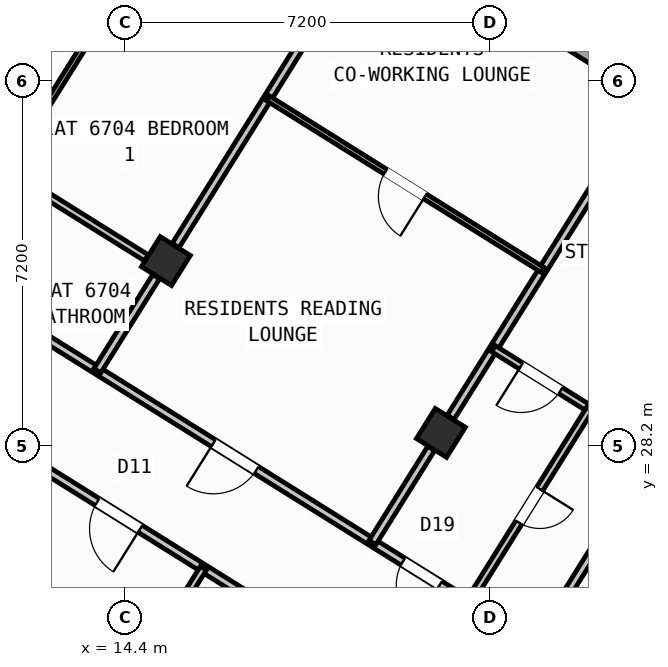
"""IFC4 building model, lengths in metres.
Left out: names, types, materials, properties, quantities, classifications, styles, units other than length and angle.
Written with IfcOpenShell. Run it as: python <this file> out.ifc"""

import sys

from ifc_helpers import new_model, si_unit, direction, frame, frame_2d, origin, origin_2d, place, context, subcontext, project, spatial, rectangle, hollow_rectangle, extrude, source, transform, mapped, element, fill, save


model = new_model("IFC4")
c1 = context("Model", 3, precision=1e-05, world=origin(), true_north=direction((0.0, 1.0)))
c2 = subcontext(c1, "Body", "Model", "MODEL_VIEW")
j1 = project(units=[si_unit("LENGTHUNIT", "METRE"), si_unit("PLANEANGLEUNIT", "RADIAN")], contexts=[c1])
p1 = place(None, origin())
s1 = spatial("IfcSite", under=j1, at=p1, CompositionType="ELEMENT")
p2 = place(p1, origin())
s2 = spatial("IfcBuilding", under=s1, at=p2, CompositionType="ELEMENT")
p3 = place(p2, frame((0.0, 0.0, 266.4)))
s3 = spatial("IfcBuildingStorey", under=s2, at=p3, CompositionType="ELEMENT", Elevation=266.4)
m1 = source(origin(), c2, "Body", "SweptSolid", [
    extrude(hollow_rectangle(XDim=0.7, YDim=0.7, WallThickness=0.028, at=origin_2d()), origin(), (0.0, 0.0, 1.0), 3.6),
])
for number, where, z_axis, x_axis in (
    (1, (20.632, 28.452, 0.0), (0.0, 0.0, 1.0), (-0.848, 0.53, 0.0)),
    (2, (15.205, 31.844, 0.0), (0.0, 0.0, 1.0), (-0.848, 0.53, 0.0)),
):
    element("IfcColumn", number, at=place(p3, frame(where, z_axis=z_axis, x_axis=x_axis)), inside=s3, PredefinedType="COLUMN", context=c2, shape_type="MappedRepresentation", body=[
        mapped(m1, transform((0.0, 0.0, 0.0), scale=1.0)),
    ])
p4 = place(p3, frame((2.415, 23.452, 0.0), z_axis=(0.0, 0.0, 1.0), x_axis=(0.52991049553, 0.848053575387, 0.0)))
e3 = element("IfcWall", 3, at=p4, inside=s3, PredefinedType="STANDARD", context=c2, shape_type="SweptSolid", body=[
    extrude(rectangle(XDim=21.587, YDim=0.32, at=frame_2d((10.794, 0.0))), origin(), (0.0, 0.0, 1.0), 2.875),
])
p5 = place(p4, frame((2.606, 0.0, 0.9)))
e4 = element("IfcOpeningElement", 4, at=p5, cuts=e3, PredefinedType="OPENING", context=c2, shape_type="SweptSolid", body=[
    extrude(rectangle(XDim=1.65, YDim=1.45, at=frame_2d((0.825, 0.725))), frame((0.0, 0.17, 0.0), z_axis=(0.0, -1.0, 0.0), x_axis=(1.0, 0.0, 0.0)), (0.0, 0.0, 1.0), 0.34),
])
p6 = place(p4, frame((7.504, 0.0, 1.0)))
e5 = element("IfcOpeningElement", 5, at=p6, cuts=e3, PredefinedType="OPENING", context=c2, shape_type="SweptSolid", body=[
    extrude(rectangle(XDim=0.9, YDim=1.25, at=frame_2d((0.45, 0.625))), frame((0.0, 0.17, 0.0), z_axis=(0.0, -1.0, 0.0), x_axis=(1.0, 0.0, 0.0)), (0.0, 0.0, 1.0), 0.34),
])
p7 = place(p4, frame((12.084, 0.0, 1.0)))
e6 = element("IfcOpeningElement", 6, at=p7, cuts=e3, PredefinedType="OPENING", context=c2, shape_type="SweptSolid", body=[
    extrude(rectangle(XDim=0.9, YDim=1.25, at=frame_2d((0.45, 0.625))), frame((0.0, 0.17, 0.0), z_axis=(0.0, -1.0, 0.0), x_axis=(1.0, 0.0, 0.0)), (0.0, 0.0, 1.0), 0.34),
])
p8 = place(p4, frame((15.619, 0.0, 1.0)))
e7 = element("IfcOpeningElement", 7, at=p8, cuts=e3, PredefinedType="OPENING", context=c2, shape_type="SweptSolid", body=[
    extrude(rectangle(XDim=0.9, YDim=1.25, at=frame_2d((0.45, 0.625))), frame((0.0, 0.17, 0.0), z_axis=(0.0, -1.0, 0.0), x_axis=(1.0, 0.0, 0.0)), (0.0, 0.0, 1.0), 0.34),
])
p9 = place(p4, frame((18.569, 0.0, 1.0)))
e8 = element("IfcOpeningElement", 8, at=p9, cuts=e3, PredefinedType="OPENING", context=c2, shape_type="SweptSolid", body=[
    extrude(rectangle(XDim=0.9, YDim=1.25, at=frame_2d((0.45, 0.625))), frame((0.0, 0.17, 0.0), z_axis=(0.0, -1.0, 0.0), x_axis=(1.0, 0.0, 0.0)), (0.0, 0.0, 1.0), 0.34),
])
p10 = place(p3, frame((14.138, 41.825, 0.0), z_axis=(0.0, 0.0, 1.0), x_axis=(0.848046498049, -0.529921821731, 0.0)))
e9 = element("IfcWall", 9, at=p10, inside=s3, PredefinedType="STANDARD", context=c2, shape_type="SweptSolid", body=[
    extrude(rectangle(XDim=31.588, YDim=0.32, at=frame_2d((15.794, 0.0))), origin(), (0.0, 0.0, 1.0), 3.35),
])
p11 = place(p10, frame((3.46, 0.0, 0.0)))
e10 = element("IfcOpeningElement", 10, at=p11, cuts=e9, PredefinedType="OPENING", context=c2, shape_type="SweptSolid", body=[
    extrude(rectangle(XDim=1.05, YDim=2.15, at=frame_2d((0.525, 1.075))), frame((0.0, 0.17, 0.0), z_axis=(0.0, -1.0, 0.0), x_axis=(1.0, 0.0, 0.0)), (0.0, 0.0, 1.0), 0.34),
])
p12 = place(p10, frame((0.831, 0.0, 1.0)))
e11 = element("IfcOpeningElement", 11, at=p12, cuts=e9, PredefinedType="OPENING", context=c2, shape_type="SweptSolid", body=[
    extrude(rectangle(XDim=0.9, YDim=1.25, at=frame_2d((0.45, 0.625))), frame((0.0, 0.17, 0.0), z_axis=(0.0, -1.0, 0.0), x_axis=(1.0, 0.0, 0.0)), (0.0, 0.0, 1.0), 0.34),
])
p13 = place(p10, frame((8.719, 0.0, 0.9)))
e12 = element("IfcOpeningElement", 12, at=p13, cuts=e9, PredefinedType="OPENING", context=c2, shape_type="SweptSolid", body=[
    extrude(rectangle(XDim=1.35, YDim=1.45, at=frame_2d((0.675, 0.725))), frame((0.0, 0.17, 0.0), z_axis=(0.0, -1.0, 0.0), x_axis=(1.0, 0.0, 0.0)), (0.0, 0.0, 1.0), 0.34),
])
p14 = place(p10, frame((13.599, 0.0, 0.95)))
e13 = element("IfcOpeningElement", 13, at=p14, cuts=e9, PredefinedType="OPENING", context=c2, shape_type="SweptSolid", body=[
    extrude(rectangle(XDim=1.95, YDim=1.35, at=frame_2d((0.975, 0.675))), frame((0.0, 0.17, 0.0), z_axis=(0.0, -1.0, 0.0), x_axis=(1.0, 0.0, 0.0)), (0.0, 0.0, 1.0), 0.34),
])
p15 = place(p10, frame((17.154, 0.0, 1.0)))
e14 = element("IfcOpeningElement", 14, at=p15, cuts=e9, PredefinedType="OPENING", context=c2, shape_type="SweptSolid", body=[
    extrude(rectangle(XDim=0.9, YDim=1.25, at=frame_2d((0.45, 0.625))), frame((0.0, 0.17, 0.0), z_axis=(0.0, -1.0, 0.0), x_axis=(1.0, 0.0, 0.0)), (0.0, 0.0, 1.0), 0.34),
])
p16 = place(p10, frame((21.719, 0.0, 0.9)))
e15 = element("IfcOpeningElement", 15, at=p16, cuts=e9, PredefinedType="OPENING", context=c2, shape_type="SweptSolid", body=[
    extrude(rectangle(XDim=1.65, YDim=1.45, at=frame_2d((0.825, 0.725))), frame((0.0, 0.17, 0.0), z_axis=(0.0, -1.0, 0.0), x_axis=(1.0, 0.0, 0.0)), (0.0, 0.0, 1.0), 0.34),
])
p17 = place(p10, frame((27.419, 0.0, 0.9)))
e16 = element("IfcOpeningElement", 16, at=p17, cuts=e9, PredefinedType="OPENING", context=c2, shape_type="SweptSolid", body=[
    extrude(rectangle(XDim=1.65, YDim=1.45, at=frame_2d((0.825, 0.725))), frame((0.0, 0.17, 0.0), z_axis=(0.0, -1.0, 0.0), x_axis=(1.0, 0.0, 0.0)), (0.0, 0.0, 1.0), 0.34),
])
p18 = place(p3, frame((27.953, 33.016, 0.0), z_axis=(0.0, 0.0, 1.0), x_axis=(-0.529909450694, -0.848054228257, 0.0)))
e17 = element("IfcWall", 17, at=p18, inside=s3, PredefinedType="PARTITIONING", context=c2, shape_type="SweptSolid", body=[
    extrude(rectangle(XDim=10.3, YDim=0.16, at=frame_2d((5.15, 0.0))), origin(), (0.0, 0.0, 1.0), 3.34),
])
p19 = place(p3, frame((22.495, 24.281, 0.0), z_axis=(0.0, 0.0, 1.0), x_axis=(-0.848052408131, 0.529912363569, 0.0)))
e18 = element("IfcWall", 18, at=p19, inside=s3, PredefinedType="PARTITIONING", context=c2, shape_type="SweptSolid", body=[
    extrude(rectangle(XDim=16.73, YDim=0.16, at=frame_2d((8.365, 0.0))), origin(), (0.0, 0.0, 1.0), 3.34),
])
p20 = place(p19, frame((2.22, 0.0, 0.0)))
e19 = element("IfcOpeningElement", 19, at=p20, cuts=e18, PredefinedType="OPENING", context=c2, shape_type="SweptSolid", body=[
    extrude(rectangle(XDim=0.86, YDim=2.05, at=frame_2d((0.43, 1.025))), frame((0.0, 0.09, 0.0), z_axis=(0.0, -1.0, 0.0), x_axis=(1.0, 0.0, 0.0)), (0.0, 0.0, 1.0), 0.18),
])
p21 = place(p19, frame((6.49, 0.0, 0.0)))
e20 = element("IfcOpeningElement", 20, at=p21, cuts=e18, PredefinedType="OPENING", context=c2, shape_type="SweptSolid", body=[
    extrude(rectangle(XDim=1.0, YDim=2.1, at=frame_2d((0.5, 1.05))), frame((0.0, 0.09, 0.0), z_axis=(0.0, -1.0, 0.0), x_axis=(1.0, 0.0, 0.0)), (0.0, 0.0, 1.0), 0.18),
])
p22 = place(p19, frame((14.76, 0.0, 0.0)))
e21 = element("IfcOpeningElement", 21, at=p22, cuts=e18, PredefinedType="OPENING", context=c2, shape_type="SweptSolid", body=[
    extrude(rectangle(XDim=1.0, YDim=2.1, at=frame_2d((0.5, 1.05))), frame((0.0, 0.09, 0.0), z_axis=(0.0, -1.0, 0.0), x_axis=(1.0, 0.0, 0.0)), (0.0, 0.0, 1.0), 0.18),
])
p23 = place(p3, frame((21.329, 22.416, 0.0), z_axis=(0.0, 0.0, 1.0), x_axis=(-0.848052408131, 0.529912363569, 0.0)))
e22 = element("IfcWall", 22, at=p23, inside=s3, PredefinedType="PARTITIONING", context=c2, shape_type="SweptSolid", body=[
    extrude(rectangle(XDim=16.73, YDim=0.16, at=frame_2d((8.365, 0.0))), origin(), (0.0, 0.0, 1.0), 3.34),
])
p24 = place(p23, frame((1.395, 0.0, 0.0)))
e23 = element("IfcOpeningElement", 23, at=p24, cuts=e22, PredefinedType="OPENING", context=c2, shape_type="SweptSolid", body=[
    extrude(rectangle(XDim=1.0, YDim=2.1, at=frame_2d((0.5, 1.05))), frame((0.0, 0.09, 0.0), z_axis=(0.0, -1.0, 0.0), x_axis=(1.0, 0.0, 0.0)), (0.0, 0.0, 1.0), 0.18),
])
p25 = place(p23, frame((7.82, 0.0, 0.0)))
e24 = element("IfcOpeningElement", 24, at=p25, cuts=e22, PredefinedType="OPENING", context=c2, shape_type="SweptSolid", body=[
    extrude(rectangle(XDim=1.0, YDim=2.1, at=frame_2d((0.5, 1.05))), frame((0.0, 0.09, 0.0), z_axis=(0.0, -1.0, 0.0), x_axis=(1.0, 0.0, 0.0)), (0.0, 0.0, 1.0), 0.18),
])
p26 = place(p23, frame((11.14, 0.0, 0.0)))
e25 = element("IfcOpeningElement", 25, at=p26, cuts=e22, PredefinedType="OPENING", context=c2, shape_type="SweptSolid", body=[
    extrude(rectangle(XDim=1.0, YDim=2.1, at=frame_2d((0.5, 1.05))), frame((0.0, 0.09, 0.0), z_axis=(0.0, -1.0, 0.0), x_axis=(1.0, 0.0, 0.0)), (0.0, 0.0, 1.0), 0.18),
])
p27 = place(p3, frame((15.944, 25.781, 0.0), z_axis=(0.0, 0.0, 1.0), x_axis=(-0.529917480809, -0.848049210561, 0.0)))
e26 = element("IfcWall", 26, at=p27, inside=s3, PredefinedType="PLUMBINGWALL", context=c2, shape_type="SweptSolid", body=[
    extrude(rectangle(XDim=4.58, YDim=0.14, at=frame_2d((2.29, 0.0))), origin(), (0.0, 0.0, 1.0), 3.34),
])
p28 = place(p27, frame((1.9, 0.0, 0.0)))
e27 = element("IfcOpeningElement", 27, at=p28, cuts=e26, PredefinedType="OPENING", context=c2, shape_type="SweptSolid", body=[
    extrude(rectangle(XDim=0.78, YDim=2.05, at=frame_2d((0.39, 1.025))), frame((0.0, 0.08, 0.0), z_axis=(0.0, -1.0, 0.0), x_axis=(1.0, 0.0, 0.0)), (0.0, 0.0, 1.0), 0.16),
])
p29 = place(p3, frame((24.309, 34.336, 0.0), z_axis=(0.0, 0.0, 1.0), x_axis=(-0.529895484599, -0.848062954858, 0.0)))
e28 = element("IfcWall", 28, at=p29, inside=s3, PredefinedType="PARTITIONING", context=c2, shape_type="SweptSolid", body=[
    extrude(rectangle(XDim=6.576, YDim=0.16, at=frame_2d((3.288, 0.0))), origin(), (0.0, 0.0, 1.0), 2.875),
])
p30 = place(p3, frame((20.44, 28.145, 0.0), z_axis=(0.0, 0.0, 1.0), x_axis=(-0.5299186965, -0.848048450915, 0.0)))
e29 = element("IfcWall", 29, at=p30, inside=s3, PredefinedType="PARTITIONING", context=c2, shape_type="SweptSolid", body=[
    extrude(rectangle(XDim=2.188, YDim=0.16, at=frame_2d((1.094, 0.0))), origin(), (0.0, 0.0, 1.0), 2.875),
])
p31 = place(p3, frame((24.885, 28.106, 0.0), z_axis=(0.0, 0.0, 1.0), x_axis=(-0.848059820872, 0.529900500304, 0.0)))
e30 = element("IfcWall", 30, at=p31, inside=s3, PredefinedType="PLUMBINGWALL", context=c2, shape_type="SweptSolid", body=[
    extrude(rectangle(XDim=3.79, YDim=0.14, at=frame_2d((1.895, 0.0))), origin(), (0.0, 0.0, 1.0), 3.34),
])
p32 = place(p31, frame((2.23, 0.0, 0.0)))
e31 = element("IfcOpeningElement", 31, at=p32, cuts=e30, PredefinedType="OPENING", context=c2, shape_type="SweptSolid", body=[
    extrude(rectangle(XDim=0.92, YDim=2.08, at=frame_2d((0.46, 1.04))), frame((0.0, 0.08, 0.0), z_axis=(0.0, -1.0, 0.0), x_axis=(1.0, 0.0, 0.0)), (0.0, 0.0, 1.0), 0.16),
])
p33 = place(p3, frame((23.57, 28.927, 0.0), z_axis=(0.0, 0.0, 1.0), x_axis=(-0.529911350634, -0.84805304107, 0.0)))
e32 = element("IfcWall", 32, at=p33, inside=s3, PredefinedType="PLUMBINGWALL", context=c2, shape_type="SweptSolid", body=[
    extrude(rectangle(XDim=4.51, YDim=0.14, at=frame_2d((2.255, 0.0))), origin(), (0.0, 0.0, 1.0), 3.025),
])
p34 = place(p33, frame((1.865, 0.0, 0.0)))
e33 = element("IfcOpeningElement", 33, at=p34, cuts=e32, PredefinedType="OPENING", context=c2, shape_type="SweptSolid", body=[
    extrude(rectangle(XDim=0.78, YDim=2.05, at=frame_2d((0.39, 1.025))), frame((0.0, 0.08, 0.0), z_axis=(0.0, -1.0, 0.0), x_axis=(1.0, 0.0, 0.0)), (0.0, 0.0, 1.0), 0.16),
])
p35 = place(p3, frame((18.881, 37.727, 0.0), z_axis=(0.0, 0.0, 1.0), x_axis=(-0.529938869374, -0.84803584519, 0.0)))
e34 = element("IfcWall", 34, at=p35, inside=s3, PredefinedType="PARTITIONING", context=c2, shape_type="SweptSolid", body=[
    extrude(rectangle(XDim=6.576, YDim=0.16, at=frame_2d((3.288, 0.0))), origin(), (0.0, 0.0, 1.0), 2.875),
])
p36 = place(p3, frame((15.013, 31.537, 0.0), z_axis=(0.0, 0.0, 1.0), x_axis=(-0.5299186965, -0.848048450915, 0.0)))
e35 = element("IfcWall", 35, at=p36, inside=s3, PredefinedType="PARTITIONING", context=c2, shape_type="SweptSolid", body=[
    extrude(rectangle(XDim=2.188, YDim=0.16, at=frame_2d((1.094, 0.0))), origin(), (0.0, 0.0, 1.0), 2.875),
])
p37 = place(p3, frame((22.642, 31.668, 0.0), z_axis=(0.0, 0.0, 1.0), x_axis=(-0.84806687439, 0.529889211593, 0.0)))
e36 = element("IfcWall", 36, at=p37, inside=s3, PredefinedType="PARTITIONING", context=c2, shape_type="SweptSolid", body=[
    extrude(rectangle(XDim=6.4, YDim=0.11, at=frame_2d((3.2, 0.0))), origin(), (0.0, 0.0, 1.0), 3.34),
])
p38 = place(p37, frame((2.74, 0.0, 0.0)))
e37 = element("IfcOpeningElement", 37, at=p38, cuts=e36, PredefinedType="OPENING", context=c2, shape_type="SweptSolid", body=[
    extrude(rectangle(XDim=0.92, YDim=2.08, at=frame_2d((0.46, 1.04))), frame((0.0, 0.065, 0.0), z_axis=(0.0, -1.0, 0.0), x_axis=(1.0, 0.0, 0.0)), (0.0, 0.0, 1.0), 0.13),
])
p39 = place(p3, frame((16.385, 40.563, 0.0), z_axis=(0.0, 0.0, 1.0), x_axis=(-0.529924195719, -0.848045014602, 0.0)))
e38 = element("IfcWall", 38, at=p39, inside=s3, PredefinedType="PARTITIONING", context=c2, shape_type="SweptSolid", body=[
    extrude(rectangle(XDim=10.57, YDim=0.11, at=frame_2d((5.285, 0.0))), origin(), (0.0, 0.0, 1.0), 3.34),
])
p40 = place(p39, frame((8.93, 0.0, 0.0)))
e39 = element("IfcOpeningElement", 39, at=p40, cuts=e38, PredefinedType="OPENING", context=c2, shape_type="SweptSolid", body=[
    extrude(rectangle(XDim=0.78, YDim=2.05, at=frame_2d((0.39, 1.025))), frame((0.0, 0.065, 0.0), z_axis=(0.0, -1.0, 0.0), x_axis=(1.0, 0.0, 0.0)), (0.0, 0.0, 1.0), 0.13),
])
p41 = place(p39, frame((3.625, 0.0, 0.0)))
e40 = element("IfcOpeningElement", 40, at=p41, cuts=e38, PredefinedType="OPENING", context=c2, shape_type="SweptSolid", body=[
    extrude(rectangle(XDim=0.92, YDim=2.08, at=frame_2d((0.46, 1.04))), frame((0.0, 0.065, 0.0), z_axis=(0.0, -1.0, 0.0), x_axis=(1.0, 0.0, 0.0)), (0.0, 0.0, 1.0), 0.13),
])
p42 = place(p3, frame((14.818, 31.908, 0.0), z_axis=(0.0, 0.0, 1.0), x_axis=(-0.848036190178, 0.529938317305, 0.0)))
e41 = element("IfcWall", 41, at=p42, inside=s3, PredefinedType="PLUMBINGWALL", context=c2, shape_type="SweptSolid", body=[
    extrude(rectangle(XDim=3.258, YDim=0.14, at=frame_2d((1.629, 0.0))), origin(), (0.0, 0.0, 1.0), 2.875),
])
m2 = source(origin(), c2, "Body", "SweptSolid", [
    extrude(rectangle(XDim=1.0, YDim=2.1, at=frame_2d((0.5, 1.05))), frame((0.0, 0.025, 0.0), z_axis=(0.0, -1.0, 0.0), x_axis=(1.0, 0.0, 0.0)), (0.0, 0.0, 1.0), 0.05),
])
p43 = place(p25, origin())
e42 = element("IfcDoor", 42, at=p43, inside=s3, OperationType="SINGLE_SWING_LEFT", PredefinedType="DOOR", context=c2, shape_type="MappedRepresentation", body=[
    mapped(m2, transform((0.0, 0.0, 0.0), scale=1.0)),
])
fill(e24, e42)
m3 = source(origin(), c2, "Body", "SweptSolid", [
    extrude(rectangle(XDim=0.86, YDim=2.05, at=frame_2d((0.43, 1.025))), frame((0.0, 0.025, 0.0), z_axis=(0.0, -1.0, 0.0), x_axis=(1.0, 0.0, 0.0)), (0.0, 0.0, 1.0), 0.05),
])
p44 = place(p20, origin())
e43 = element("IfcDoor", 43, at=p44, inside=s3, OperationType="SINGLE_SWING_LEFT", PredefinedType="DOOR", context=c2, shape_type="MappedRepresentation", body=[
    mapped(m3, transform((0.0, 0.0, 0.0), scale=1.0)),
])
fill(e19, e43)
m4 = source(origin(), c2, "Body", "SweptSolid", [
    extrude(rectangle(XDim=0.92, YDim=2.08, at=frame_2d((0.46, 1.04))), frame((0.0, 0.025, 0.0), z_axis=(0.0, -1.0, 0.0), x_axis=(1.0, 0.0, 0.0)), (0.0, 0.0, 1.0), 0.05),
])
p45 = place(p32, origin())
e44 = element("IfcDoor", 44, at=p45, inside=s3, OperationType="SINGLE_SWING_RIGHT", PredefinedType="DOOR", context=c2, shape_type="MappedRepresentation", body=[
    mapped(m4, transform((0.0, 0.0, 0.0), scale=1.0)),
])
fill(e31, e44)
m5 = source(origin(), c2, "Body", "SweptSolid", [
    extrude(rectangle(XDim=0.78, YDim=2.05, at=frame_2d((0.39, 1.025))), frame((0.0, 0.025, 0.0), z_axis=(0.0, -1.0, 0.0), x_axis=(1.0, 0.0, 0.0)), (0.0, 0.0, 1.0), 0.05),
])
p46 = place(p34, origin())
e45 = element("IfcDoor", 45, at=p46, inside=s3, OperationType="SINGLE_SWING_LEFT", PredefinedType="DOOR", context=c2, shape_type="MappedRepresentation", body=[
    mapped(m5, transform((0.0, 0.0, 0.0), scale=1.0)),
])
fill(e33, e45)
p47 = place(p21, origin())
e46 = element("IfcDoor", 46, at=p47, inside=s3, OperationType="SINGLE_SWING_RIGHT", PredefinedType="DOOR", context=c2, shape_type="MappedRepresentation", body=[
    mapped(m2, transform((0.0, 0.0, 0.0), scale=1.0)),
])
fill(e20, e46)
p48 = place(p38, origin())
e47 = element("IfcDoor", 47, at=p48, inside=s3, OperationType="SINGLE_SWING_LEFT", PredefinedType="DOOR", context=c2, shape_type="MappedRepresentation", body=[
    mapped(m4, transform((0.0, 0.0, 0.0), scale=1.0)),
])
fill(e37, e47)
save(model, sys.argv[1])
